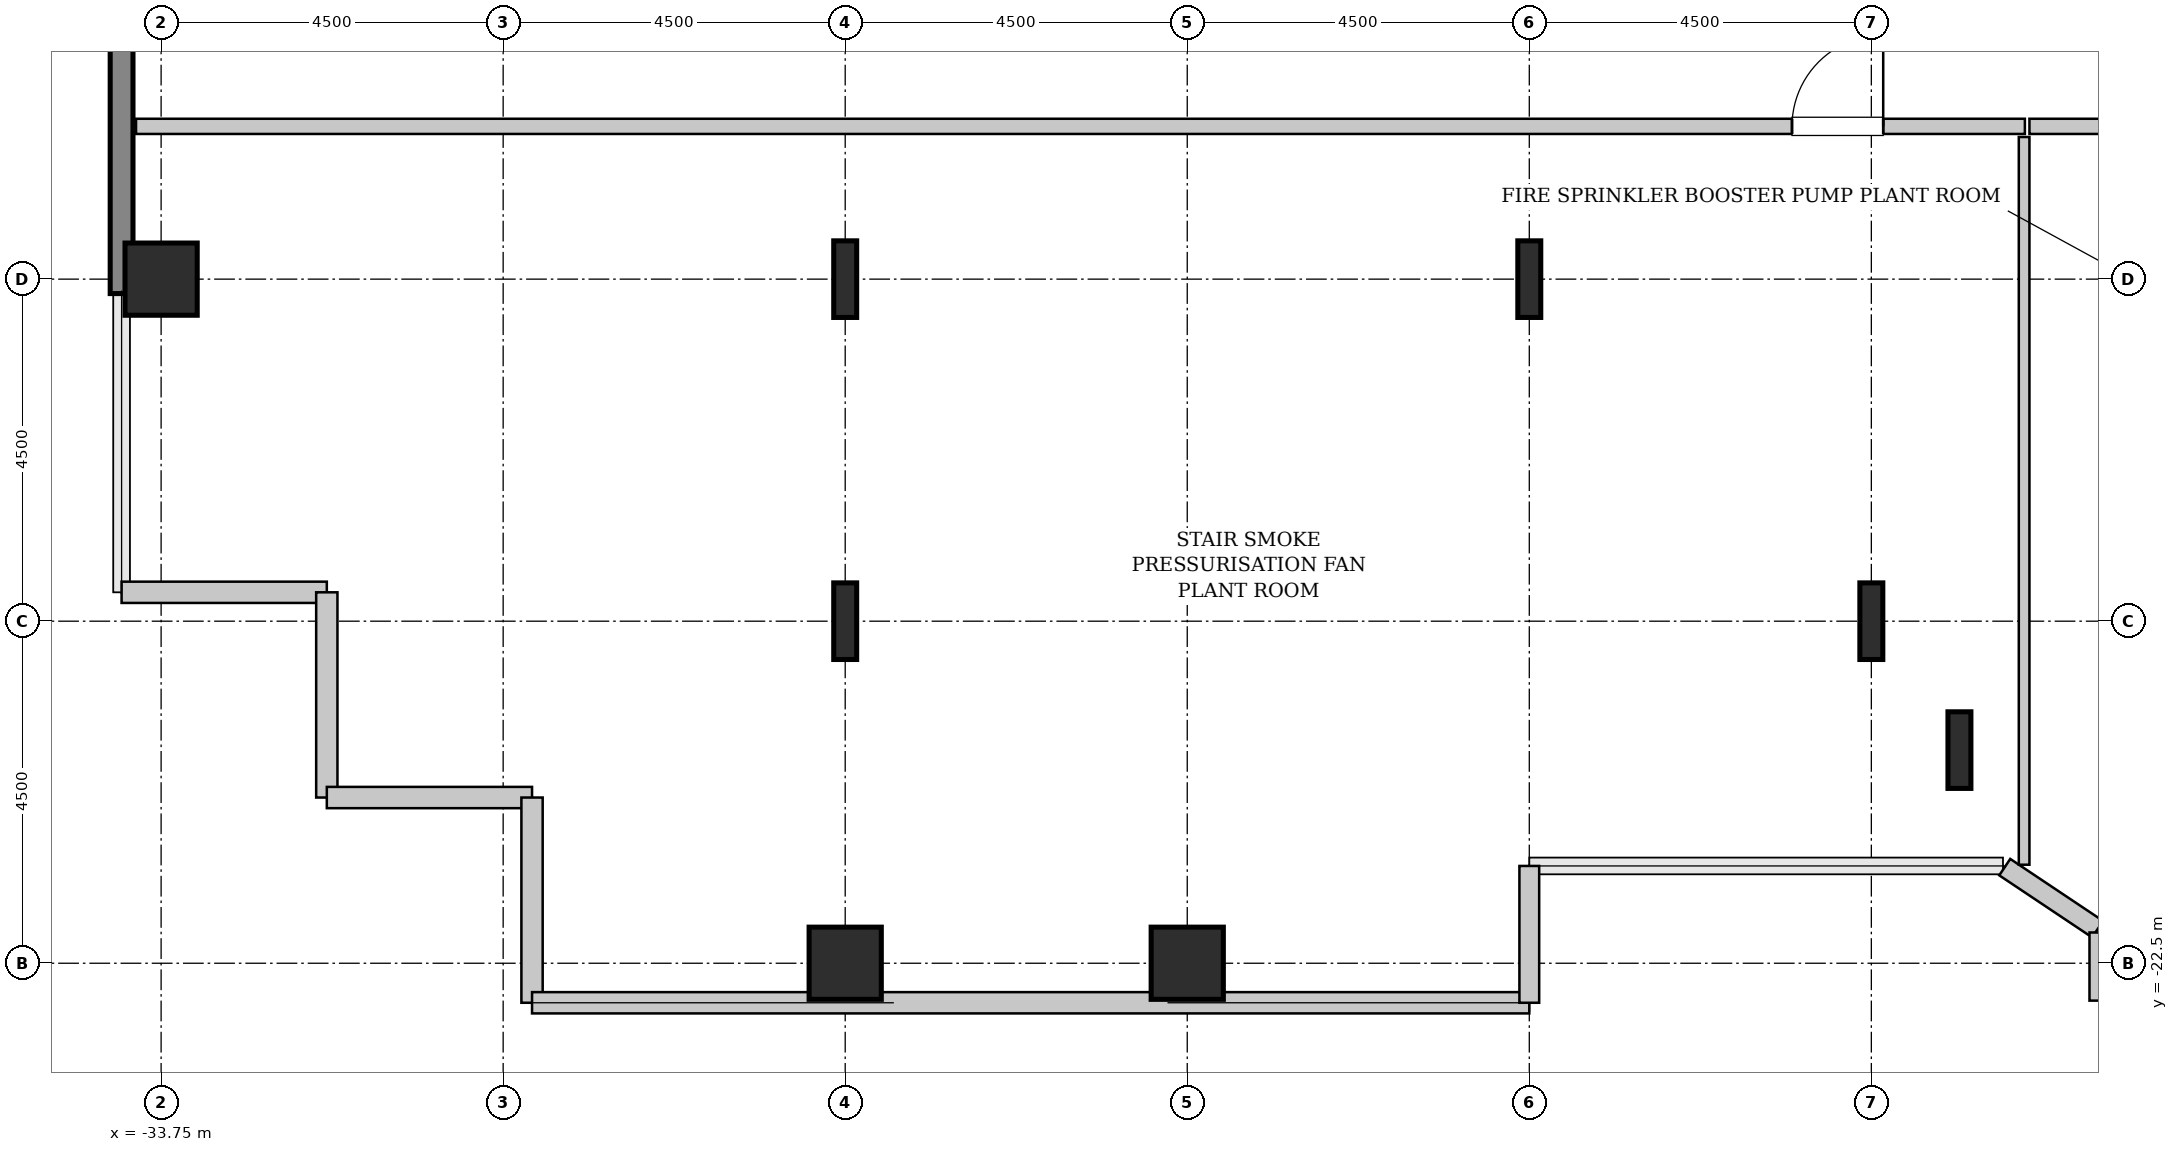
"""IFC4 building model, lengths in metres.
Left out: names, types, materials, properties, quantities, classifications, styles, units other than length and angle.
Written with IfcOpenShell. Run it as: python <this file> out.ifc"""

import sys

from ifc_helpers import new_model, si_unit, direction, frame, frame_2d, origin, origin_2d, place, context, subcontext, project, spatial, rectangle, hollow_rectangle, i_section, extrude, source, transform, mapped, element, fill, save


model = new_model("IFC4")
c1 = context("Model", 3, precision=1e-05, world=origin(), true_north=direction((0.0, 1.0)))
c2 = subcontext(c1, "Body", "Model", "MODEL_VIEW")
j1 = project(units=[si_unit("LENGTHUNIT", "METRE"), si_unit("PLANEANGLEUNIT", "RADIAN")], contexts=[c1])
p1 = place(None, origin())
s1 = spatial("IfcSite", under=j1, at=p1, CompositionType="ELEMENT")
p2 = place(p1, origin())
s2 = spatial("IfcBuilding", under=s1, at=p2, CompositionType="ELEMENT")
p3 = place(p2, frame((0.0, 0.0, 86.2)))
s3 = spatial("IfcBuildingStorey", under=s2, at=p3, CompositionType="ELEMENT", Elevation=86.2)
m1 = source(origin(), c2, "Body", "SweptSolid", [
    extrude(hollow_rectangle(XDim=0.95, YDim=0.95, WallThickness=0.045, InnerFilletRadius=0.045, OuterFilletRadius=0.09, at=origin_2d()), origin(), (0.0, 0.0, 1.0), 4.6),
])
for number, where, z_axis, x_axis in (
    (1, (-33.75, -13.5, 0.0), (0.0, 0.0, 1.0), (1.0, 0.0, 0.0)),
    (2, (-24.75, -22.5, 0.0), (0.0, 0.0, 1.0), (1.0, 0.0, 0.0)),
):
    element("IfcColumn", number, at=place(p3, frame(where, z_axis=z_axis, x_axis=x_axis)), inside=s3, PredefinedType="COLUMN", context=c2, shape_type="MappedRepresentation", body=[
        mapped(m1, transform((0.0, 0.0, 0.0), x_axis=(1.0, 0.0, 0.0), y_axis=(0.0, 1.0, 0.0), z_axis=(0.0, 0.0, 1.0), scale=1.0)),
    ])
m2 = source(origin(), c2, "Body", "SweptSolid", [
    extrude(i_section(OverallWidth=0.302, OverallDepth=1.008, WebThickness=0.021, FlangeThickness=0.04, FilletRadius=0.03, at=origin_2d()), origin(), (0.0, 0.0, 1.0), 4.6),
])
for number, where, z_axis, x_axis in (
    (3, (-24.75, -18.0, 0.0), (0.0, 0.0, 1.0), (1.0, 0.0, 0.0)),
    (4, (-24.75, -13.5, 0.0), (0.0, 0.0, 1.0), (1.0, 0.0, 0.0)),
):
    element("IfcColumn", number, at=place(p3, frame(where, z_axis=z_axis, x_axis=x_axis)), inside=s3, PredefinedType="COLUMN", context=c2, shape_type="MappedRepresentation", body=[
        mapped(m2, transform((0.0, 0.0, 0.0), x_axis=(1.0, 0.0, 0.0), y_axis=(0.0, 1.0, 0.0), z_axis=(0.0, 0.0, 1.0), scale=1.0)),
    ])
p4 = place(p3, frame((-20.25, -22.5, 0.0), z_axis=(0.0, 0.0, 1.0), x_axis=(1.0, 0.0, 0.0)))
e5 = element("IfcColumn", 5, at=p4, inside=s3, PredefinedType="COLUMN", context=c2, shape_type="MappedRepresentation", body=[
    mapped(m1, transform((0.0, 0.0, 0.0), x_axis=(1.0, 0.0, 0.0), y_axis=(0.0, 1.0, 0.0), z_axis=(0.0, 0.0, 1.0), scale=1.0)),
])
for number, where, z_axis, x_axis in (
    (6, (-15.75, -13.5, 0.0), (0.0, 0.0, 1.0), (1.0, 0.0, 0.0)),
    (7, (-11.25, -18.0, 0.0), (0.0, 0.0, 1.0), (1.0, 0.0, 0.0)),
    (8, (-10.091, -19.696, 0.0), (0.0, 0.0, 1.0), (1.0, 0.0, 0.0)),
):
    element("IfcColumn", number, at=place(p3, frame(where, z_axis=z_axis, x_axis=x_axis)), inside=s3, PredefinedType="COLUMN", context=c2, shape_type="MappedRepresentation", body=[
        mapped(m2, transform((0.0, 0.0, 0.0), x_axis=(1.0, 0.0, 0.0), y_axis=(0.0, 1.0, 0.0), z_axis=(0.0, 0.0, 1.0), scale=1.0)),
    ])
m3 = source(origin(), c2, "Body", "SweptSolid", [
    extrude(rectangle(XDim=9.38, YDim=0.3, at=frame_2d((4.69, 0.0))), origin(), (0.0, 0.0, 1.0), 4.35),
])
p5 = place(p3, frame((-34.27, -13.69, 0.0), z_axis=(0.0, 0.0, 1.0), x_axis=(0.0, 1.0, 0.0)))
e9 = element("IfcWall", 9, at=p5, inside=s3, PredefinedType="SHEAR", context=c2, shape_type="MappedRepresentation", body=[
    mapped(m3, transform((0.0, 0.0, 0.0), x_axis=(1.0, 0.0, 0.0), y_axis=(0.0, 1.0, 0.0), z_axis=(0.0, 0.0, 1.0), scale=1.0)),
])
m4 = source(origin(), c2, "Body", "SweptSolid", [
    extrude(rectangle(XDim=2.7, YDim=0.28, at=frame_2d((1.35, 0.0))), origin(), (0.0, 0.0, 1.0), 4.35),
])
for number, where, z_axis, x_axis in (
    (10, (-34.27, -17.62, 0.0), (0.0, 0.0, 1.0), (1.0, 0.0, 0.0)),
    (11, (-31.57, -17.62, 0.0), (0.0, 0.0, 1.0), (0.0, -1.0, 0.0)),
    (12, (-31.57, -20.32, 0.0), (0.0, 0.0, 1.0), (1.0, 0.0, 0.0)),
    (13, (-28.87, -20.32, 0.0), (0.0, 0.0, 1.0), (0.0, -1.0, 0.0)),
):
    element("IfcWall", number, at=place(p3, frame(where, z_axis=z_axis, x_axis=x_axis)), inside=s3, PredefinedType="SOLIDWALL", context=c2, shape_type="MappedRepresentation", body=[
        mapped(m4, transform((0.0, 0.0, 0.0), x_axis=(1.0, 0.0, 0.0), y_axis=(0.0, 1.0, 0.0), z_axis=(0.0, 0.0, 1.0), scale=1.0)),
    ])
m5 = source(origin(), c2, "Body", "SweptSolid", [
    extrude(rectangle(XDim=13.12, YDim=0.28, at=frame_2d((6.56, 0.0))), origin(), (0.0, 0.0, 1.0), 1.1),
])
p6 = place(p3, frame((-28.87, -23.02, 0.0), z_axis=(0.0, 0.0, 1.0), x_axis=(1.0, 0.0, 0.0)))
e14 = element("IfcWall", 14, at=p6, inside=s3, PredefinedType="SOLIDWALL", context=c2, shape_type="MappedRepresentation", body=[
    mapped(m5, transform((0.0, 0.0, 0.0), x_axis=(1.0, 0.0, 0.0), y_axis=(0.0, 1.0, 0.0), z_axis=(0.0, 0.0, 1.0), scale=1.0)),
])
m6 = source(origin(), c2, "Body", "SweptSolid", [
    extrude(rectangle(XDim=1.8, YDim=0.26, at=frame_2d((0.9, 0.0))), origin(), (0.0, 0.0, 1.0), 4.35),
])
p7 = place(p3, frame((-15.75, -23.02, 0.0), z_axis=(0.0, 0.0, 1.0), x_axis=(0.0, 1.0, 0.0)))
e15 = element("IfcWall", 15, at=p7, inside=s3, PredefinedType="SOLIDWALL", context=c2, shape_type="MappedRepresentation", body=[
    mapped(m6, transform((0.0, 0.0, 0.0), x_axis=(1.0, 0.0, 0.0), y_axis=(0.0, 1.0, 0.0), z_axis=(0.0, 0.0, 1.0), scale=1.0)),
])
m7 = source(origin(), c2, "Body", "SweptSolid", [
    extrude(rectangle(XDim=1.469, YDim=0.26, at=frame_2d((0.734, 0.0))), origin(), (0.0, 0.0, 1.0), 4.35),
])
p8 = place(p3, frame((-9.495, -21.236, 0.0), z_axis=(0.0, 0.0, 1.0), x_axis=(0.831461760506, -0.555581983884, 0.0)))
e16 = element("IfcWall", 16, at=p8, inside=s3, PredefinedType="SOLIDWALL", context=c2, shape_type="MappedRepresentation", body=[
    mapped(m7, transform((0.0, 0.0, 0.0), x_axis=(1.0, 0.0, 0.0), y_axis=(0.0, 1.0, 0.0), z_axis=(0.0, 0.0, 1.0), scale=1.0)),
])
m8 = source(origin(), c2, "Body", "SweptSolid", [
    extrude(rectangle(XDim=0.897, YDim=0.26, at=frame_2d((0.448, 0.0))), origin(), (0.0, 0.0, 1.0), 4.35),
])
p9 = place(p3, frame((-8.25, -22.095, 0.0), z_axis=(0.0, 0.0, 1.0), x_axis=(0.0, -1.0, 0.0)))
e17 = element("IfcWall", 17, at=p9, inside=s3, PredefinedType="SOLIDWALL", context=c2, shape_type="MappedRepresentation", body=[
    mapped(m8, transform((0.0, 0.0, 0.0), x_axis=(1.0, 0.0, 0.0), y_axis=(0.0, 1.0, 0.0), z_axis=(0.0, 0.0, 1.0), scale=1.0)),
])
m9 = source(origin(), c2, "Body", "SweptSolid", [
    extrude(rectangle(XDim=24.85, YDim=0.2, at=frame_2d((12.425, 0.0))), origin(), (0.0, 0.0, 1.0), 4.335),
])
p10 = place(p3, frame((-34.08, -11.49, 0.0), z_axis=(0.0, 0.0, 1.0), x_axis=(1.0, 0.0, 0.0)))
e18 = element("IfcWall", 18, at=p10, inside=s3, PredefinedType="SOLIDWALL", context=c2, shape_type="MappedRepresentation", body=[
    mapped(m9, transform((0.0, 0.0, 0.0), x_axis=(1.0, 0.0, 0.0), y_axis=(0.0, 1.0, 0.0), z_axis=(0.0, 0.0, 1.0), scale=1.0)),
])
p11 = place(p10, frame((21.786, 0.0, 0.0)))
e19 = element("IfcOpeningElement", 19, at=p11, cuts=e18, PredefinedType="OPENING", context=c2, shape_type="SweptSolid", body=[
    extrude(rectangle(XDim=1.2, YDim=2.15, at=frame_2d((0.6, 1.075))), frame((0.0, 0.11, 0.0), z_axis=(0.0, -1.0, 0.0), x_axis=(1.0, 0.0, 0.0)), (0.0, 0.0, 1.0), 0.22),
])
m10 = source(origin(), c2, "Body", "SweptSolid", [
    extrude(rectangle(XDim=9.574, YDim=0.14, at=frame_2d((4.787, 0.0))), origin(), (0.0, 0.0, 1.0), 4.335),
])
p12 = place(p3, frame((-9.24, -21.204, 0.0), z_axis=(0.0, 0.0, 1.0), x_axis=(0.0, 1.0, 0.0)))
e20 = element("IfcWall", 20, at=p12, inside=s3, PredefinedType="PARTITIONING", context=c2, shape_type="MappedRepresentation", body=[
    mapped(m10, transform((0.0, 0.0, 0.0), x_axis=(1.0, 0.0, 0.0), y_axis=(0.0, 1.0, 0.0), z_axis=(0.0, 0.0, 1.0), scale=1.0)),
])
m11 = source(origin(), c2, "Body", "SweptSolid", [
    extrude(rectangle(XDim=4.54, YDim=0.2, at=frame_2d((2.27, 0.0))), origin(), (0.0, 0.0, 1.0), 4.335),
])
p13 = place(p3, frame((-9.17, -11.49, 0.0), z_axis=(0.0, 0.0, 1.0), x_axis=(1.0, 0.0, 0.0)))
e21 = element("IfcWall", 21, at=p13, inside=s3, PredefinedType="SOLIDWALL", context=c2, shape_type="MappedRepresentation", body=[
    mapped(m11, transform((0.0, 0.0, 0.0), x_axis=(1.0, 0.0, 0.0), y_axis=(0.0, 1.0, 0.0), z_axis=(0.0, 0.0, 1.0), scale=1.0)),
])
p14 = place(p13, frame((1.67, 0.0, 0.0)))
e22 = element("IfcOpeningElement", 22, at=p14, cuts=e21, PredefinedType="OPENING", context=c2, shape_type="SweptSolid", body=[
    extrude(rectangle(XDim=1.2, YDim=2.15, at=frame_2d((0.6, 1.075))), frame((0.0, 0.11, 0.0), z_axis=(0.0, -1.0, 0.0), x_axis=(1.0, 0.0, 0.0)), (0.0, 0.0, 1.0), 0.22),
])
m12 = source(origin(), c2, "Body", "SweptSolid", [
    extrude(rectangle(XDim=1.2, YDim=2.15, at=frame_2d((0.6, 1.075))), frame((0.0, 0.025, 0.0), z_axis=(0.0, -1.0, 0.0), x_axis=(1.0, 0.0, 0.0)), (0.0, 0.0, 1.0), 0.05),
])
p15 = place(p11, origin())
e23 = element("IfcDoor", 23, at=p15, inside=s3, OperationType="SINGLE_SWING_RIGHT", PredefinedType="DOOR", context=c2, shape_type="MappedRepresentation", body=[
    mapped(m12, transform((0.0, 0.0, 0.0), x_axis=(1.0, 0.0, 0.0), y_axis=(0.0, 1.0, 0.0), z_axis=(0.0, 0.0, 1.0), scale=1.0)),
])
fill(e19, e23)
save(model, sys.argv[1])
